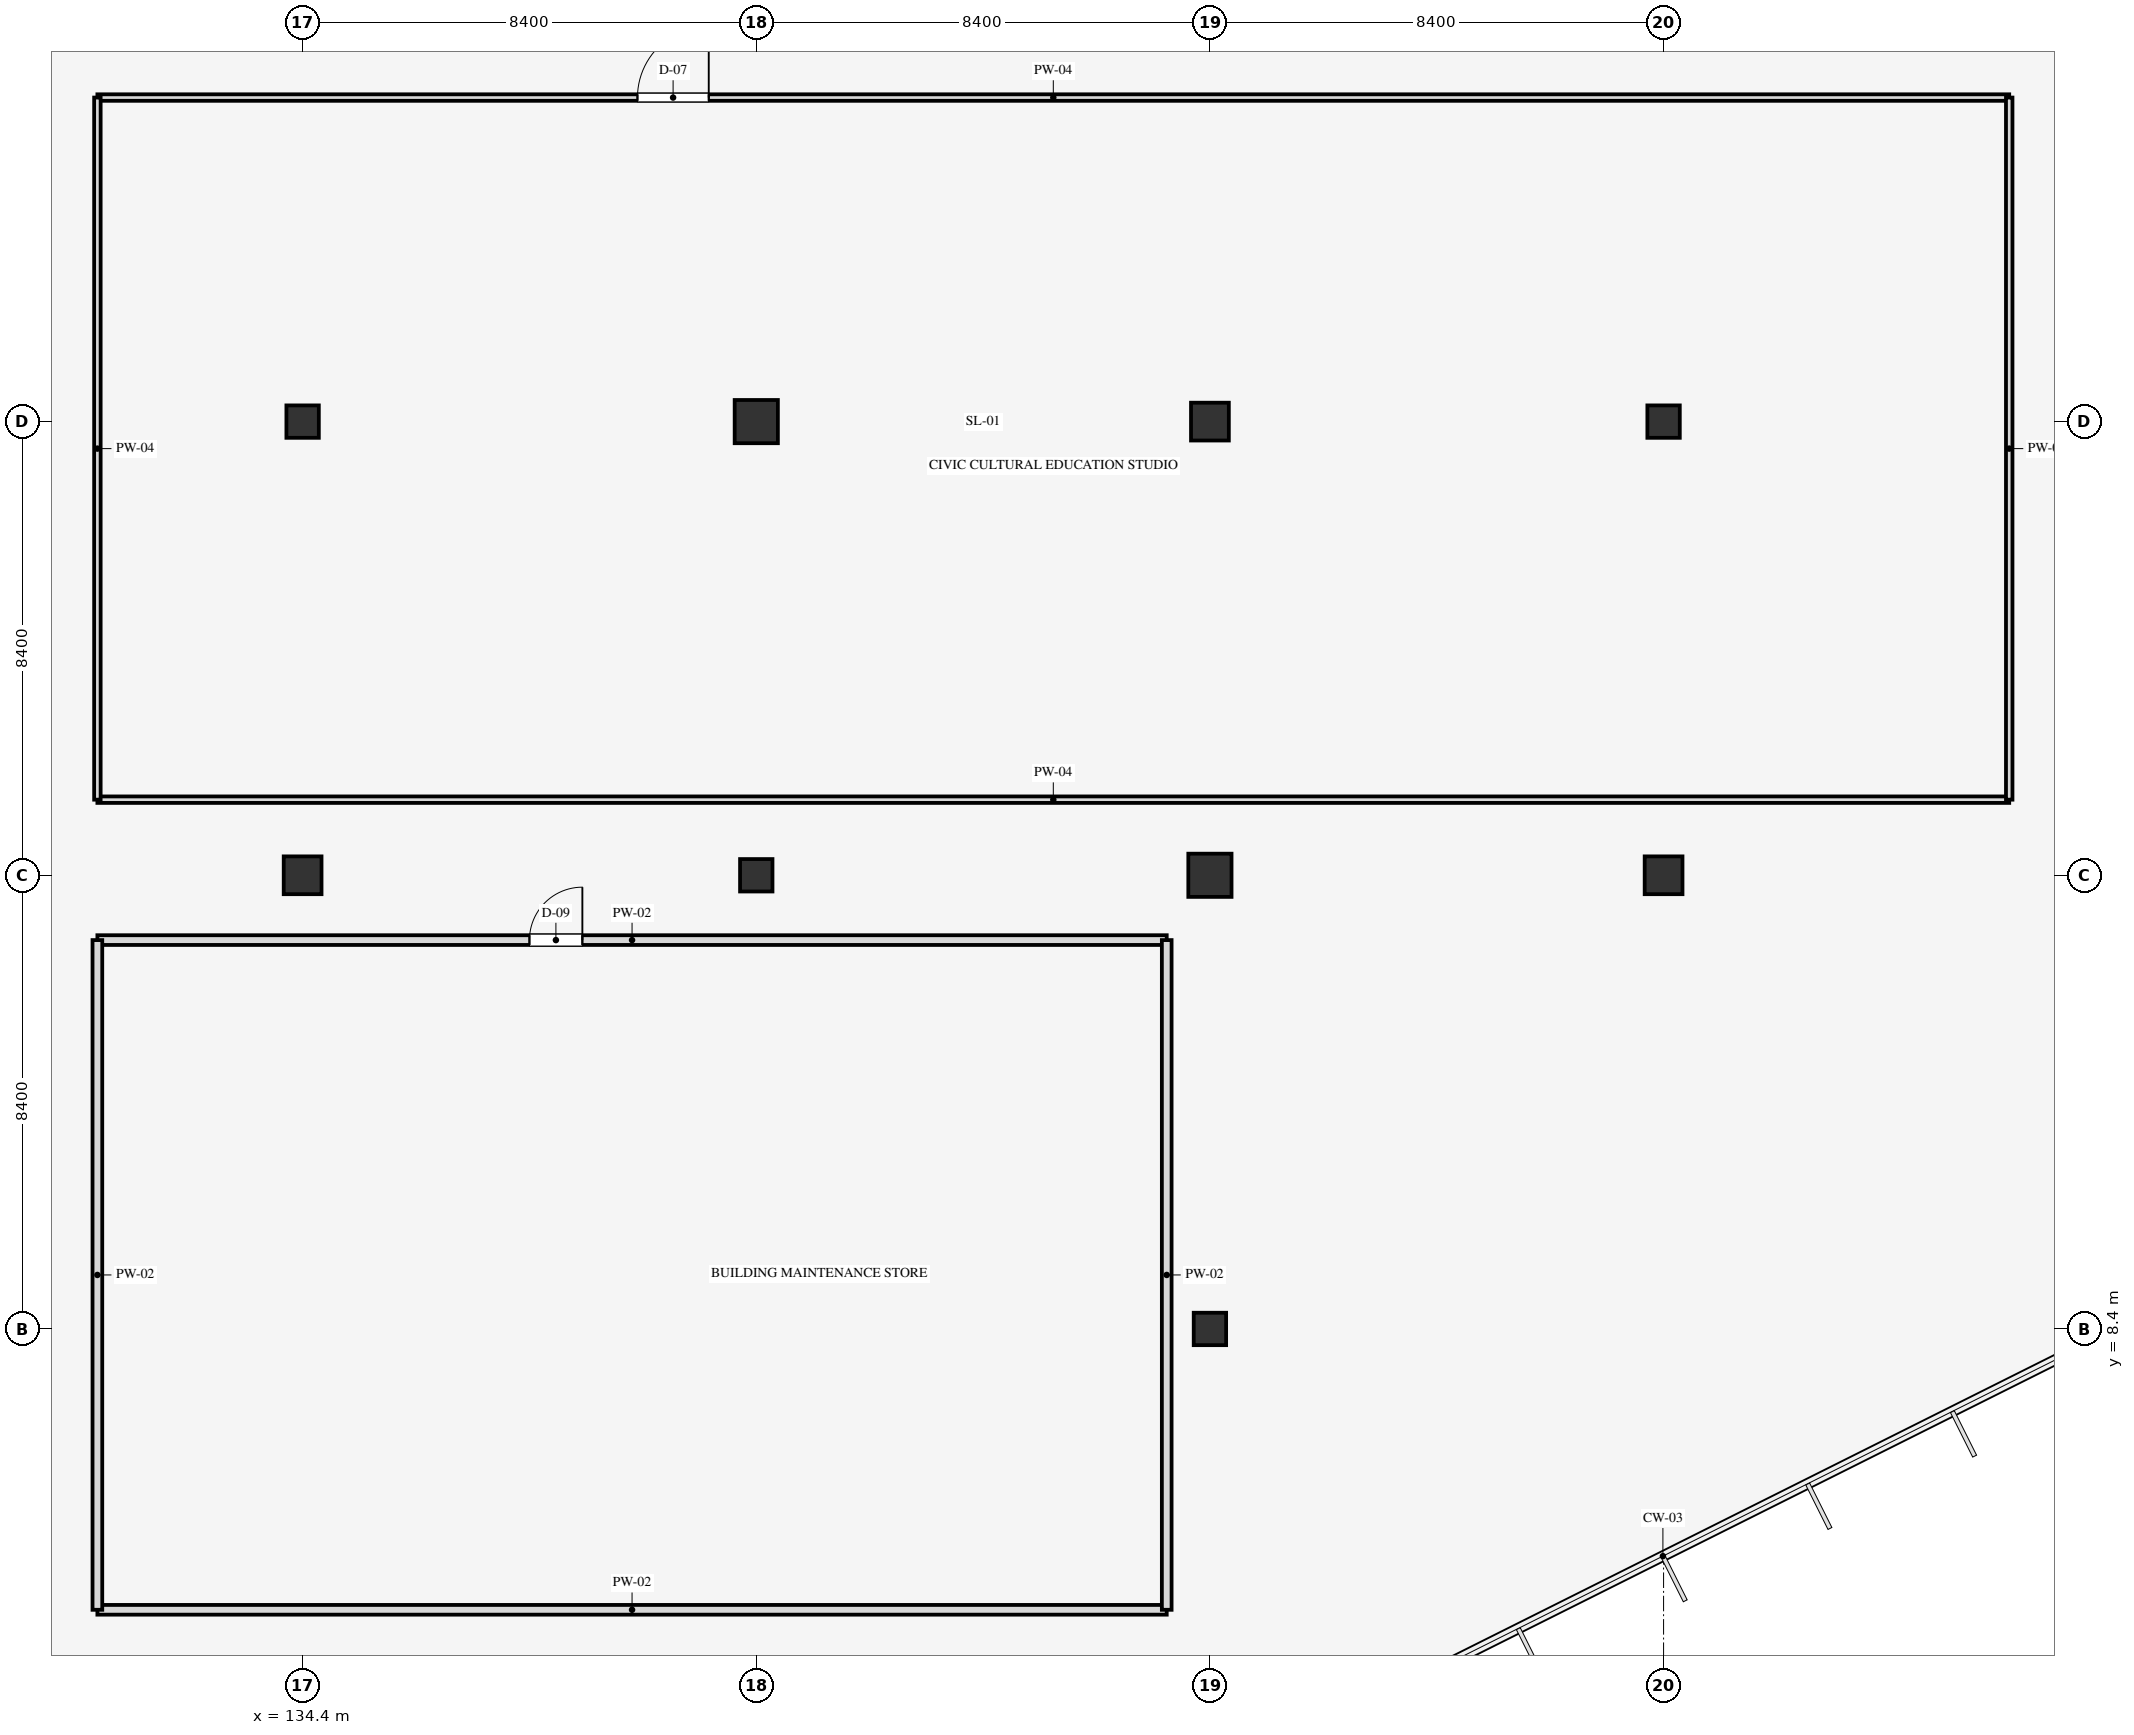
"""IFC4 building model, lengths in metres.
Left out: names, types, materials, properties, quantities, classifications, styles, units other than length and angle.
Written with IfcOpenShell. Run it as: python <this file> out.ifc"""

import sys

from ifc_helpers import new_model, si_unit, direction, frame, frame_2d, origin, origin_2d, place, context, subcontext, project, spatial, rectangle, extrude, element, fill, save


model = new_model("IFC4")
c1 = context("Model", 3, precision=1e-05, world=origin(), true_north=direction((0.0, 1.0)))
c2 = subcontext(c1, "Body", "Model", "MODEL_VIEW")
j1 = project(units=[si_unit("LENGTHUNIT", "METRE"), si_unit("PLANEANGLEUNIT", "RADIAN")], contexts=[c1])
p1 = place(None, origin())
s1 = spatial("IfcSite", under=j1, at=p1, CompositionType="ELEMENT")
p2 = place(p1, origin())
s2 = spatial("IfcBuilding", under=s1, at=p2, CompositionType="ELEMENT")
p3 = place(p2, origin())
s3 = spatial("IfcBuildingStorey", under=s2, at=p3, CompositionType="ELEMENT", Elevation=0.0)
p4 = place(p3, frame((134.4, 16.8, 0.0), z_axis=(0.0, 0.0, 1.0), x_axis=(1.0, 0.0, 0.0)))
e1 = element("IfcColumn", 1, at=p4, inside=s3, PredefinedType="COLUMN", context=c2, shape_type="SweptSolid", body=[
    extrude(rectangle(XDim=0.7, YDim=0.7, at=origin_2d()), origin(), (0.0, 0.0, 1.0), 5.4),
])
for number, where, z_axis, x_axis in (
    (2, (134.4, 25.2, 0.0), (0.0, 0.0, 1.0), (1.0, 0.0, 0.0)),
    (3, (142.8, 16.8, 0.0), (0.0, 0.0, 1.0), (1.0, 0.0, 0.0)),
):
    element("IfcColumn", number, at=place(p3, frame(where, z_axis=z_axis, x_axis=x_axis)), inside=s3, PredefinedType="COLUMN", context=c2, shape_type="SweptSolid", body=[
        extrude(rectangle(XDim=0.6, YDim=0.6, at=origin_2d()), origin(), (0.0, 0.0, 1.0), 5.4),
    ])
p5 = place(p3, frame((142.8, 25.2, 0.0), z_axis=(0.0, 0.0, 1.0), x_axis=(1.0, 0.0, 0.0)))
e4 = element("IfcColumn", 4, at=p5, inside=s3, PredefinedType="COLUMN", context=c2, shape_type="SweptSolid", body=[
    extrude(rectangle(XDim=0.8, YDim=0.8, at=origin_2d()), origin(), (0.0, 0.0, 1.0), 5.4),
])
p6 = place(p3, frame((151.2, 8.4, 0.0), z_axis=(0.0, 0.0, 1.0), x_axis=(1.0, 0.0, 0.0)))
e5 = element("IfcColumn", 5, at=p6, inside=s3, PredefinedType="COLUMN", context=c2, shape_type="SweptSolid", body=[
    extrude(rectangle(XDim=0.6, YDim=0.6, at=origin_2d()), origin(), (0.0, 0.0, 1.0), 5.4),
])
p7 = place(p3, frame((151.2, 16.8, 0.0), z_axis=(0.0, 0.0, 1.0), x_axis=(1.0, 0.0, 0.0)))
e6 = element("IfcColumn", 6, at=p7, inside=s3, PredefinedType="COLUMN", context=c2, shape_type="SweptSolid", body=[
    extrude(rectangle(XDim=0.8, YDim=0.8, at=origin_2d()), origin(), (0.0, 0.0, 1.0), 5.4),
])
for number, where, z_axis, x_axis in (
    (7, (151.2, 25.2, 0.0), (0.0, 0.0, 1.0), (1.0, 0.0, 0.0)),
    (8, (159.6, 16.8, 0.0), (0.0, 0.0, 1.0), (1.0, 0.0, 0.0)),
):
    element("IfcColumn", number, at=place(p3, frame(where, z_axis=z_axis, x_axis=x_axis)), inside=s3, PredefinedType="COLUMN", context=c2, shape_type="SweptSolid", body=[
        extrude(rectangle(XDim=0.7, YDim=0.7, at=origin_2d()), origin(), (0.0, 0.0, 1.0), 5.4),
    ])
p8 = place(p3, frame((159.6, 25.2, 0.0), z_axis=(0.0, 0.0, 1.0), x_axis=(1.0, 0.0, 0.0)))
e9 = element("IfcColumn", 9, at=p8, inside=s3, PredefinedType="COLUMN", context=c2, shape_type="SweptSolid", body=[
    extrude(rectangle(XDim=0.6, YDim=0.6, at=origin_2d()), origin(), (0.0, 0.0, 1.0), 5.4),
])
p9 = place(p3, frame((130.6, 18.2, 0.0), z_axis=(0.0, 0.0, 1.0), x_axis=(1.0, 0.0, 0.0)))
e10 = element("IfcWall", 10, at=p9, inside=s3, PredefinedType="PARTITIONING", context=c2, shape_type="SweptSolid", body=[
    extrude(rectangle(XDim=35.4, YDim=0.12, at=frame_2d((17.7, 0.0))), origin(), (0.0, 0.0, 1.0), 4.44),
])
p10 = place(p3, frame((130.6, 31.2, 0.0), z_axis=(0.0, 0.0, 1.0), x_axis=(1.0, 0.0, 0.0)))
e11 = element("IfcWall", 11, at=p10, inside=s3, PredefinedType="PARTITIONING", context=c2, shape_type="SweptSolid", body=[
    extrude(rectangle(XDim=35.4, YDim=0.12, at=frame_2d((17.7, 0.0))), origin(), (0.0, 0.0, 1.0), 4.44),
])
p11 = place(p10, frame((10.0, 0.0, 0.0)))
e12 = element("IfcOpeningElement", 12, at=p11, cuts=e11, PredefinedType="OPENING", context=c2, shape_type="SweptSolid", body=[
    extrude(rectangle(XDim=1.32, YDim=2.18, at=frame_2d((0.66, 1.09))), frame((0.0, 0.07, 0.0), z_axis=(0.0, -1.0, 0.0), x_axis=(1.0, 0.0, 0.0)), (0.0, 0.0, 1.0), 0.14),
])
for number, where, z_axis, x_axis in (
    (13, (130.6, 18.2, 0.0), (0.0, 0.0, 1.0), (0.0, 1.0, 0.0)),
    (14, (166.0, 18.2, 0.0), (0.0, 0.0, 1.0), (0.0, 1.0, 0.0)),
):
    element("IfcWall", number, at=place(p3, frame(where, z_axis=z_axis, x_axis=x_axis)), inside=s3, PredefinedType="PARTITIONING", context=c2, shape_type="SweptSolid", body=[
        extrude(rectangle(XDim=13.0, YDim=0.12, at=frame_2d((6.5, 0.0))), origin(), (0.0, 0.0, 1.0), 4.44),
    ])
p12 = place(p3, frame((130.6, 3.2, 0.0), z_axis=(0.0, 0.0, 1.0), x_axis=(1.0, 0.0, 0.0)))
e15 = element("IfcWall", 15, at=p12, inside=s3, PredefinedType="PARTITIONING", context=c2, shape_type="SweptSolid", body=[
    extrude(rectangle(XDim=19.8, YDim=0.18, at=frame_2d((9.9, 0.0))), origin(), (0.0, 0.0, 1.0), 4.44),
])
p13 = place(p3, frame((130.6, 15.6, 0.0), z_axis=(0.0, 0.0, 1.0), x_axis=(1.0, 0.0, 0.0)))
e16 = element("IfcWall", 16, at=p13, inside=s3, PredefinedType="PARTITIONING", context=c2, shape_type="SweptSolid", body=[
    extrude(rectangle(XDim=19.8, YDim=0.18, at=frame_2d((9.9, 0.0))), origin(), (0.0, 0.0, 1.0), 4.44),
])
p14 = place(p13, frame((8.0, 0.0, 0.0)))
e17 = element("IfcOpeningElement", 17, at=p14, cuts=e16, PredefinedType="OPENING", context=c2, shape_type="SweptSolid", body=[
    extrude(rectangle(XDim=0.98, YDim=2.12, at=frame_2d((0.49, 1.06))), frame((0.0, 0.1, 0.0), z_axis=(0.0, -1.0, 0.0), x_axis=(1.0, 0.0, 0.0)), (0.0, 0.0, 1.0), 0.2),
])
for number, where, z_axis, x_axis in (
    (18, (130.6, 3.2, 0.0), (0.0, 0.0, 1.0), (0.0, 1.0, 0.0)),
    (19, (150.4, 3.2, 0.0), (0.0, 0.0, 1.0), (0.0, 1.0, 0.0)),
):
    element("IfcWall", number, at=place(p3, frame(where, z_axis=z_axis, x_axis=x_axis)), inside=s3, PredefinedType="PARTITIONING", context=c2, shape_type="SweptSolid", body=[
        extrude(rectangle(XDim=12.4, YDim=0.18, at=frame_2d((6.2, 0.0))), origin(), (0.0, 0.0, 1.0), 4.44),
    ])
p15 = place(p11, origin())
e20 = element("IfcDoor", 20, at=p15, inside=s3, OperationType="SINGLE_SWING_RIGHT", PredefinedType="DOOR", context=c2, shape_type="SweptSolid", body=[
    extrude(rectangle(XDim=1.32, YDim=2.18, at=frame_2d((0.66, 1.09))), frame((0.0, 0.025, 0.0), z_axis=(0.0, -1.0, 0.0), x_axis=(1.0, 0.0, 0.0)), (0.0, 0.0, 1.0), 0.05),
])
fill(e12, e20)
p16 = place(p14, origin())
e21 = element("IfcDoor", 21, at=p16, inside=s3, OperationType="SINGLE_SWING_RIGHT", PredefinedType="DOOR", context=c2, shape_type="SweptSolid", body=[
    extrude(rectangle(XDim=0.98, YDim=2.12, at=frame_2d((0.49, 1.06))), frame((0.0, 0.025, 0.0), z_axis=(0.0, -1.0, 0.0), x_axis=(1.0, 0.0, 0.0)), (0.0, 0.0, 1.0), 0.05),
])
fill(e17, e21)
save(model, sys.argv[1])
